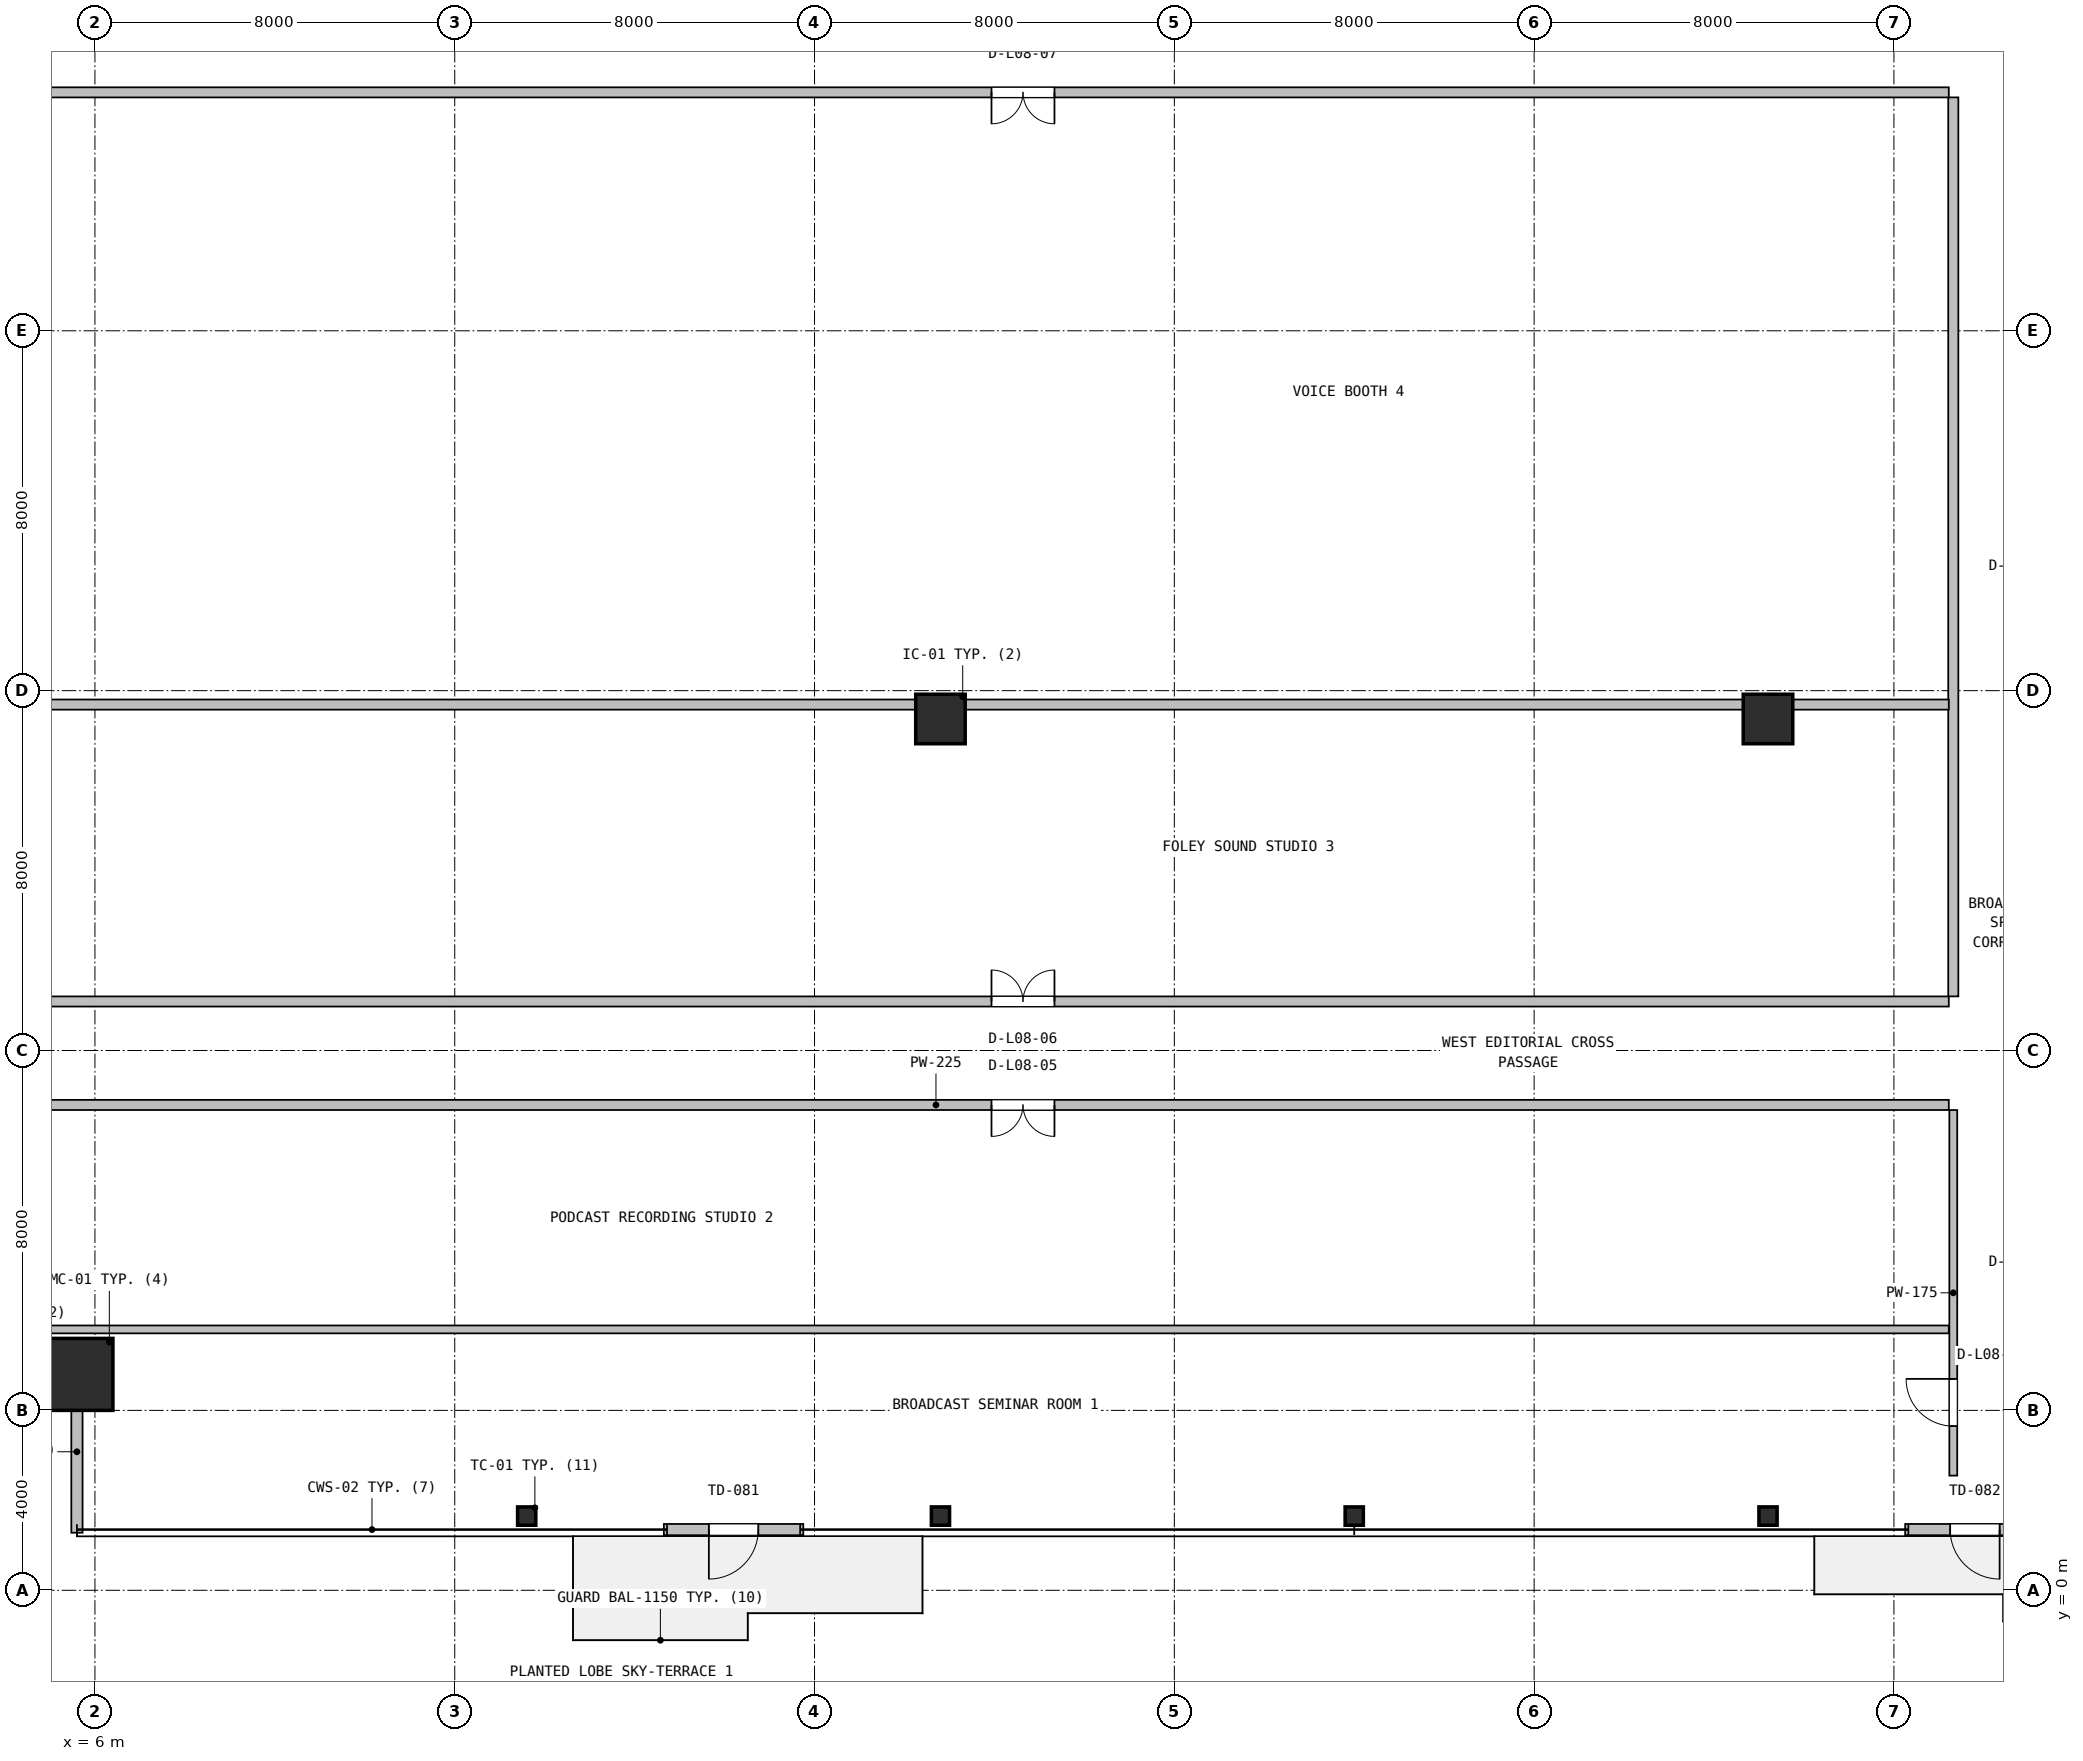
"""IFC4 building model, lengths in metres.
Left out: names, types, materials, properties, quantities, classifications, styles, units other than length and angle.
Written with IfcOpenShell. Run it as: python <this file> out.ifc"""

import sys

from ifc_helpers import new_model, si_unit, direction, frame, frame_2d, origin, origin_2d, place, context, subcontext, project, spatial, rectangle, hollow_rectangle, i_section, extrude, source, transform, mapped, element, fill, save


model = new_model("IFC4")
c1 = context("Model", 3, precision=1e-05, world=origin(), true_north=direction((0.0, 1.0)))
c2 = subcontext(c1, "Body", "Model", "MODEL_VIEW")
j1 = project(units=[si_unit("LENGTHUNIT", "METRE"), si_unit("PLANEANGLEUNIT", "RADIAN")], contexts=[c1])
p1 = place(None, origin())
s1 = spatial("IfcSite", under=j1, at=p1, CompositionType="ELEMENT")
p2 = place(p1, origin())
s2 = spatial("IfcBuilding", under=s1, at=p2, CompositionType="ELEMENT")
p3 = place(p2, frame((0.0, 0.0, 39.3)))
s3 = spatial("IfcBuildingStorey", under=s2, at=p3, CompositionType="ELEMENT", Elevation=39.3)
m1 = source(origin(), c2, "Body", "SweptSolid", [
    extrude(hollow_rectangle(XDim=1.6, YDim=1.6, WallThickness=0.06, at=origin_2d()), origin(), (0.0, 0.0, 1.0), 3.9),
])
p4 = place(p3, frame((5.6, 4.8, 0.0), z_axis=(0.0, 0.0, 1.0), x_axis=(1.0, 0.0, 0.0)))
e1 = element("IfcColumn", 1, at=p4, inside=s3, PredefinedType="COLUMN", context=c2, shape_type="MappedRepresentation", body=[
    mapped(m1, transform((0.0, 0.0, 0.0), x_axis=(1.0, 0.0, 0.0), y_axis=(0.0, 1.0, 0.0), z_axis=(0.0, 0.0, 1.0), scale=1.0)),
])
m2 = source(origin(), c2, "Body", "SweptSolid", [
    extrude(i_section(OverallWidth=0.404, OverallDepth=0.407, WebThickness=0.027, FlangeThickness=0.044, FilletRadius=0.018, at=origin_2d()), origin(), (0.0, 0.0, 1.0), 3.9),
])
for number, where, z_axis, x_axis in (
    (2, (15.6, 1.65, 0.0), (0.0, 0.0, 1.0), (1.0, 0.0, 0.0)),
    (3, (24.8, 1.65, 0.0), (0.0, 0.0, 1.0), (1.0, 0.0, 0.0)),
    (4, (34.0, 1.65, 0.0), (0.0, 0.0, 1.0), (1.0, 0.0, 0.0)),
    (5, (43.2, 1.65, 0.0), (0.0, 0.0, 1.0), (1.0, 0.0, 0.0)),
):
    element("IfcColumn", number, at=place(p3, frame(where, z_axis=z_axis, x_axis=x_axis)), inside=s3, PredefinedType="COLUMN", context=c2, shape_type="MappedRepresentation", body=[
        mapped(m2, transform((0.0, 0.0, 0.0), x_axis=(1.0, 0.0, 0.0), y_axis=(0.0, 1.0, 0.0), z_axis=(0.0, 0.0, 1.0), scale=1.0)),
    ])
m3 = source(origin(), c2, "Body", "SweptSolid", [
    extrude(rectangle(XDim=1.1, YDim=1.1, at=origin_2d()), origin(), (0.0, 0.0, 1.0), 3.9),
])
for number, where, z_axis, x_axis in (
    (6, (24.8, 19.37, 0.0), (0.0, 0.0, 1.0), (1.0, 0.0, 0.0)),
    (7, (43.2, 19.37, 0.0), (0.0, 0.0, 1.0), (1.0, 0.0, 0.0)),
):
    element("IfcColumn", number, at=place(p3, frame(where, z_axis=z_axis, x_axis=x_axis)), inside=s3, PredefinedType="COLUMN", context=c2, shape_type="MappedRepresentation", body=[
        mapped(m3, transform((0.0, 0.0, 0.0), x_axis=(1.0, 0.0, 0.0), y_axis=(0.0, 1.0, 0.0), z_axis=(0.0, 0.0, 1.0), scale=1.0)),
    ])
p5 = place(p3, frame((18.65, 1.35, 0.0), z_axis=(0.0, 0.0, 1.0), x_axis=(1.0, 0.0, 0.0)))
e8 = element("IfcWall", 8, at=p5, inside=s3, PredefinedType="SOLIDWALL", context=c2, shape_type="SweptSolid", body=[
    extrude(rectangle(XDim=3.1, YDim=0.25, at=frame_2d((1.55, 0.0))), origin(), (0.0, 0.0, 1.0), 3.63),
])
p6 = place(p5, frame((1.0, 0.0, 0.0)))
e9 = element("IfcOpeningElement", 9, at=p6, cuts=e8, PredefinedType="OPENING", context=c2, shape_type="SweptSolid", body=[
    extrude(rectangle(XDim=1.1, YDim=2.15, at=frame_2d((0.55, 1.075))), frame((0.0, 0.135, 0.0), z_axis=(0.0, -1.0, 0.0), x_axis=(1.0, 0.0, 0.0)), (0.0, 0.0, 1.0), 0.27),
])
p7 = place(p3, frame((46.25, 1.35, 0.0), z_axis=(0.0, 0.0, 1.0), x_axis=(1.0, 0.0, 0.0)))
e10 = element("IfcWall", 10, at=p7, inside=s3, PredefinedType="SOLIDWALL", context=c2, shape_type="SweptSolid", body=[
    extrude(rectangle(XDim=3.1, YDim=0.25, at=frame_2d((1.55, 0.0))), origin(), (0.0, 0.0, 1.0), 3.63),
])
p8 = place(p7, frame((1.0, 0.0, 0.0)))
e11 = element("IfcOpeningElement", 11, at=p8, cuts=e10, PredefinedType="OPENING", context=c2, shape_type="SweptSolid", body=[
    extrude(rectangle(XDim=1.1, YDim=2.15, at=frame_2d((0.55, 1.075))), frame((0.0, 0.135, 0.0), z_axis=(0.0, -1.0, 0.0), x_axis=(1.0, 0.0, 0.0)), (0.0, 0.0, 1.0), 0.27),
])
p9 = place(p3, frame((5.6, 1.28, 0.0), z_axis=(0.0, 0.0, 1.0), x_axis=(0.0, 1.0, 0.0)))
e12 = element("IfcWall", 12, at=p9, inside=s3, PredefinedType="SOLIDWALL", context=c2, shape_type="SweptSolid", body=[
    extrude(rectangle(XDim=3.6, YDim=0.25, at=frame_2d((1.8, 0.0))), origin(), (0.0, 0.0, 1.0), 3.208),
])
p10 = place(p3, frame((47.32, 2.55, 0.0), z_axis=(0.0, 0.0, 1.0), x_axis=(0.0, 1.0, 0.0)))
e13 = element("IfcWall", 13, at=p10, inside=s3, PredefinedType="PARTITIONING", context=c2, shape_type="SweptSolid", body=[
    extrude(rectangle(XDim=8.127, YDim=0.175, at=frame_2d((4.063, 0.0))), origin(), (0.0, 0.0, 1.0), 3.322),
])
p11 = place(p10, frame((1.1, 0.0, 0.0)))
e14 = element("IfcOpeningElement", 14, at=p11, cuts=e13, PredefinedType="OPENING", context=c2, shape_type="SweptSolid", body=[
    extrude(rectangle(XDim=1.05, YDim=2.1, at=frame_2d((0.525, 1.05))), frame((0.0, 0.098, 0.0), z_axis=(0.0, -1.0, 0.0), x_axis=(1.0, 0.0, 0.0)), (0.0, 0.0, 1.0), 0.195),
])
p12 = place(p3, frame((2.18, 5.8, 0.0), z_axis=(0.0, 0.0, 1.0), x_axis=(1.0, 0.0, 0.0)))
e15 = element("IfcWall", 15, at=p12, inside=s3, PredefinedType="PARTITIONING", context=c2, shape_type="SweptSolid", body=[
    extrude(rectangle(XDim=45.04, YDim=0.175, at=frame_2d((22.52, 0.0))), origin(), (0.0, 0.0, 1.0), 2.852),
])
p13 = place(p3, frame((2.18, 10.79, 0.0), z_axis=(0.0, 0.0, 1.0), x_axis=(1.0, 0.0, 0.0)))
e16 = element("IfcWall", 16, at=p13, inside=s3, PredefinedType="PARTITIONING", context=c2, shape_type="SweptSolid", body=[
    extrude(rectangle(XDim=45.04, YDim=0.225, at=frame_2d((22.52, 0.0))), origin(), (0.0, 0.0, 1.0), 2.852),
])
p14 = place(p13, frame((23.755, 0.0, 0.0)))
e17 = element("IfcOpeningElement", 17, at=p14, cuts=e16, PredefinedType="OPENING", context=c2, shape_type="SweptSolid", body=[
    extrude(rectangle(XDim=1.4, YDim=2.12, at=frame_2d((0.7, 1.06))), frame((0.0, 0.123, 0.0), z_axis=(0.0, -1.0, 0.0), x_axis=(1.0, 0.0, 0.0)), (0.0, 0.0, 1.0), 0.245),
])
p15 = place(p3, frame((2.18, 13.09, 0.0), z_axis=(0.0, 0.0, 1.0), x_axis=(1.0, 0.0, 0.0)))
e18 = element("IfcWall", 18, at=p15, inside=s3, PredefinedType="PARTITIONING", context=c2, shape_type="SweptSolid", body=[
    extrude(rectangle(XDim=45.04, YDim=0.225, at=frame_2d((22.52, 0.0))), origin(), (0.0, 0.0, 1.0), 2.852),
])
p16 = place(p15, frame((23.755, 0.0, 0.0)))
e19 = element("IfcOpeningElement", 19, at=p16, cuts=e18, PredefinedType="OPENING", context=c2, shape_type="SweptSolid", body=[
    extrude(rectangle(XDim=1.4, YDim=2.12, at=frame_2d((0.7, 1.06))), frame((0.0, 0.123, 0.0), z_axis=(0.0, -1.0, 0.0), x_axis=(1.0, 0.0, 0.0)), (0.0, 0.0, 1.0), 0.245),
])
p17 = place(p3, frame((47.32, 13.203, 0.0), z_axis=(0.0, 0.0, 1.0), x_axis=(0.0, 1.0, 0.0)))
e20 = element("IfcWall", 20, at=p17, inside=s3, PredefinedType="PARTITIONING", context=c2, shape_type="SweptSolid", body=[
    extrude(rectangle(XDim=19.985, YDim=0.225, at=frame_2d((9.993, 0.0))), origin(), (0.0, 0.0, 1.0), 3.322),
])
p18 = place(p3, frame((2.18, 19.69, 0.0), z_axis=(0.0, 0.0, 1.0), x_axis=(1.0, 0.0, 0.0)))
e21 = element("IfcWall", 21, at=p18, inside=s3, PredefinedType="PARTITIONING", context=c2, shape_type="SweptSolid", body=[
    extrude(rectangle(XDim=45.04, YDim=0.225, at=frame_2d((22.52, 0.0))), origin(), (0.0, 0.0, 1.0), 2.852),
])
p19 = place(p3, frame((2.18, 33.3, 0.0), z_axis=(0.0, 0.0, 1.0), x_axis=(1.0, 0.0, 0.0)))
e22 = element("IfcWall", 22, at=p19, inside=s3, PredefinedType="PARTITIONING", context=c2, shape_type="SweptSolid", body=[
    extrude(rectangle(XDim=45.04, YDim=0.225, at=frame_2d((22.52, 0.0))), origin(), (0.0, 0.0, 1.0), 2.852),
])
p20 = place(p19, frame((23.755, 0.0, 0.0)))
e23 = element("IfcOpeningElement", 23, at=p20, cuts=e22, PredefinedType="OPENING", context=c2, shape_type="SweptSolid", body=[
    extrude(rectangle(XDim=1.4, YDim=2.12, at=frame_2d((0.7, 1.06))), frame((0.0, 0.123, 0.0), z_axis=(0.0, -1.0, 0.0), x_axis=(1.0, 0.0, 0.0)), (0.0, 0.0, 1.0), 0.245),
])
m4 = source(origin(), c2, "Body", "SweptSolid", [
    extrude(rectangle(XDim=1.1, YDim=2.15, at=frame_2d((0.55, 1.075))), frame((0.0, 0.025, 0.0), z_axis=(0.0, -1.0, 0.0), x_axis=(1.0, 0.0, 0.0)), (0.0, 0.0, 1.0), 0.05),
])
p21 = place(p6, frame((1.1, 0.0, 0.0), z_axis=(0.0, 0.0, 1.0), x_axis=(-1.0, 0.0, 0.0)))
e24 = element("IfcDoor", 24, at=p21, inside=s3, OperationType="SINGLE_SWING_LEFT", PredefinedType="DOOR", context=c2, shape_type="MappedRepresentation", body=[
    mapped(m4, transform((0.0, 0.0, 0.0), x_axis=(1.0, 0.0, 0.0), y_axis=(0.0, 1.0, 0.0), z_axis=(0.0, 0.0, 1.0), scale=1.0)),
])
fill(e9, e24)
p22 = place(p8, frame((1.1, 0.0, 0.0), z_axis=(0.0, 0.0, 1.0), x_axis=(-1.0, 0.0, 0.0)))
e25 = element("IfcDoor", 25, at=p22, inside=s3, OperationType="SINGLE_SWING_RIGHT", PredefinedType="DOOR", context=c2, shape_type="MappedRepresentation", body=[
    mapped(m4, transform((0.0, 0.0, 0.0), x_axis=(1.0, 0.0, 0.0), y_axis=(0.0, 1.0, 0.0), z_axis=(0.0, 0.0, 1.0), scale=1.0)),
])
fill(e11, e25)
m5 = source(origin(), c2, "Body", "SweptSolid", [
    extrude(rectangle(XDim=1.05, YDim=2.1, at=frame_2d((0.525, 1.05))), frame((0.0, 0.025, 0.0), z_axis=(0.0, -1.0, 0.0), x_axis=(1.0, 0.0, 0.0)), (0.0, 0.0, 1.0), 0.05),
])
p23 = place(p11, origin())
e26 = element("IfcDoor", 26, at=p23, inside=s3, OperationType="SINGLE_SWING_RIGHT", PredefinedType="DOOR", context=c2, shape_type="MappedRepresentation", body=[
    mapped(m5, transform((0.0, 0.0, 0.0), x_axis=(1.0, 0.0, 0.0), y_axis=(0.0, 1.0, 0.0), z_axis=(0.0, 0.0, 1.0), scale=1.0)),
])
fill(e14, e26)
m6 = source(origin(), c2, "Body", "SweptSolid", [
    extrude(rectangle(XDim=1.4, YDim=2.12, at=frame_2d((0.7, 1.06))), frame((0.0, 0.025, 0.0), z_axis=(0.0, -1.0, 0.0), x_axis=(1.0, 0.0, 0.0)), (0.0, 0.0, 1.0), 0.05),
])
p24 = place(p14, frame((1.4, 0.0, 0.0), z_axis=(0.0, 0.0, 1.0), x_axis=(-1.0, 0.0, 0.0)))
e27 = element("IfcDoor", 27, at=p24, inside=s3, OperationType="DOUBLE_DOOR_SINGLE_SWING", PredefinedType="DOOR", context=c2, shape_type="MappedRepresentation", body=[
    mapped(m6, transform((0.0, 0.0, 0.0), x_axis=(1.0, 0.0, 0.0), y_axis=(0.0, 1.0, 0.0), z_axis=(0.0, 0.0, 1.0), scale=1.0)),
])
fill(e17, e27)
p25 = place(p16, origin())
e28 = element("IfcDoor", 28, at=p25, inside=s3, OperationType="DOUBLE_DOOR_SINGLE_SWING", PredefinedType="DOOR", context=c2, shape_type="MappedRepresentation", body=[
    mapped(m6, transform((0.0, 0.0, 0.0), x_axis=(1.0, 0.0, 0.0), y_axis=(0.0, 1.0, 0.0), z_axis=(0.0, 0.0, 1.0), scale=1.0)),
])
fill(e19, e28)
p26 = place(p20, frame((1.4, 0.0, 0.0), z_axis=(0.0, 0.0, 1.0), x_axis=(-1.0, 0.0, 0.0)))
e29 = element("IfcDoor", 29, at=p26, inside=s3, OperationType="DOUBLE_DOOR_SINGLE_SWING", PredefinedType="DOOR", context=c2, shape_type="MappedRepresentation", body=[
    mapped(m6, transform((0.0, 0.0, 0.0), x_axis=(1.0, 0.0, 0.0), y_axis=(0.0, 1.0, 0.0), z_axis=(0.0, 0.0, 1.0), scale=1.0)),
])
fill(e23, e29)
save(model, sys.argv[1])
